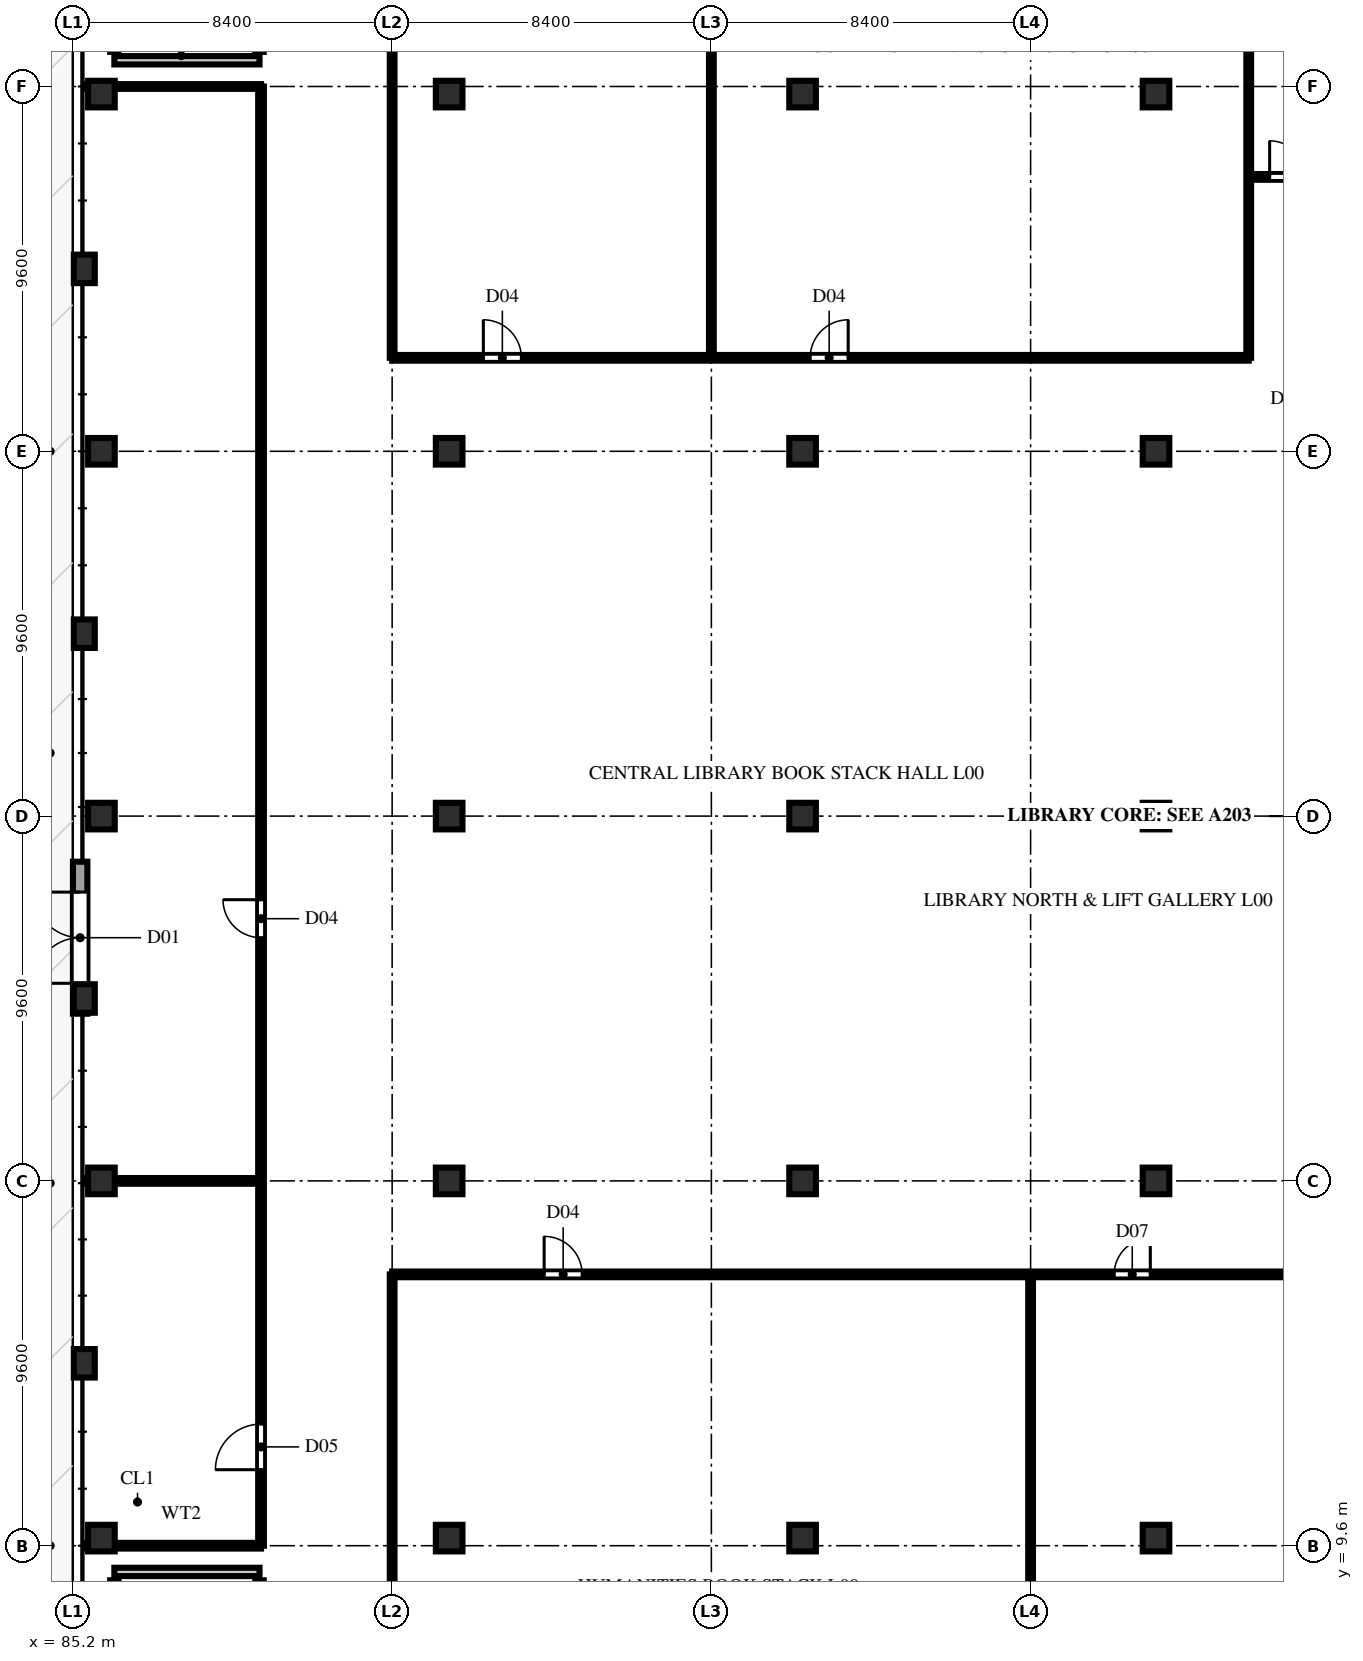
"""IFC4 building model, lengths in metres.
Left out: names, types, materials, properties, quantities, classifications, styles, units other than length and angle.
Written with IfcOpenShell. Run it as: python <this file> out.ifc"""

import sys

from ifc_helpers import new_model, si_unit, direction, frame, frame_2d, origin, origin_2d, place, context, subcontext, project, spatial, rectangle, extrude, element, fill, save


model = new_model("IFC4")
c1 = context("Model", 3, precision=1e-05, world=origin(), true_north=direction((0.0, 1.0)))
c2 = subcontext(c1, "Body", "Model", "MODEL_VIEW")
j1 = project(units=[si_unit("LENGTHUNIT", "METRE"), si_unit("PLANEANGLEUNIT", "RADIAN")], contexts=[c1])
p1 = place(None, origin())
s1 = spatial("IfcSite", under=j1, at=p1, CompositionType="ELEMENT")
p2 = place(p1, origin())
s2 = spatial("IfcBuilding", under=s1, at=p2, CompositionType="ELEMENT")
p3 = place(p2, origin())
s3 = spatial("IfcBuildingStorey", under=s2, at=p3, CompositionType="ELEMENT", Elevation=0.0)
for number, where, z_axis, x_axis in (
    (1, (85.95, 9.8, 0.0), (0.0, 0.0, 1.0), (1.0, 0.0, 0.0)),
    (2, (85.95, 19.2, 0.0), (0.0, 0.0, 1.0), (1.0, 0.0, 0.0)),
    (3, (85.95, 28.8, 0.0), (0.0, 0.0, 1.0), (1.0, 0.0, 0.0)),
    (4, (85.95, 38.4, 0.0), (0.0, 0.0, 1.0), (1.0, 0.0, 0.0)),
    (5, (85.95, 47.8, 0.0), (0.0, 0.0, 1.0), (1.0, 0.0, 0.0)),
    (6, (95.1, 9.8, 0.0), (0.0, 0.0, 1.0), (1.0, 0.0, 0.0)),
    (7, (95.1, 19.2, 0.0), (0.0, 0.0, 1.0), (1.0, 0.0, 0.0)),
    (8, (95.1, 28.8, 0.0), (0.0, 0.0, 1.0), (1.0, 0.0, 0.0)),
    (9, (95.1, 38.4, 0.0), (0.0, 0.0, 1.0), (1.0, 0.0, 0.0)),
    (10, (95.1, 47.8, 0.0), (0.0, 0.0, 1.0), (1.0, 0.0, 0.0)),
    (11, (104.4, 9.8, 0.0), (0.0, 0.0, 1.0), (1.0, 0.0, 0.0)),
    (12, (104.4, 19.2, 0.0), (0.0, 0.0, 1.0), (1.0, 0.0, 0.0)),
    (13, (104.4, 28.8, 0.0), (0.0, 0.0, 1.0), (1.0, 0.0, 0.0)),
    (14, (104.4, 38.4, 0.0), (0.0, 0.0, 1.0), (1.0, 0.0, 0.0)),
    (15, (104.4, 47.8, 0.0), (0.0, 0.0, 1.0), (1.0, 0.0, 0.0)),
    (16, (113.7, 9.8, 0.0), (0.0, 0.0, 1.0), (1.0, 0.0, 0.0)),
    (17, (113.7, 19.2, 0.0), (0.0, 0.0, 1.0), (1.0, 0.0, 0.0)),
    (18, (113.7, 28.8, 0.0), (0.0, 0.0, 1.0), (1.0, 0.0, 0.0)),
    (19, (113.7, 38.4, 0.0), (0.0, 0.0, 1.0), (1.0, 0.0, 0.0)),
    (20, (113.7, 47.8, 0.0), (0.0, 0.0, 1.0), (1.0, 0.0, 0.0)),
):
    element("IfcColumn", number, at=place(p3, frame(where, z_axis=z_axis, x_axis=x_axis)), inside=s3, PredefinedType="COLUMN", context=c2, shape_type="SweptSolid", body=[
        extrude(rectangle(XDim=0.7, YDim=0.7, at=origin_2d()), origin(), (0.0, 0.0, 1.0), 5.2),
    ])
for number, where, z_axis, x_axis in (
    (21, (85.5, 14.4, 0.0), (0.0, 0.0, 1.0), (1.0, 0.0, 0.0)),
    (22, (85.5, 24.0, 0.0), (0.0, 0.0, 1.0), (1.0, 0.0, 0.0)),
    (23, (85.5, 33.6, 0.0), (0.0, 0.0, 1.0), (1.0, 0.0, 0.0)),
    (24, (85.5, 43.2, 0.0), (0.0, 0.0, 1.0), (1.0, 0.0, 0.0)),
):
    element("IfcColumn", number, at=place(p3, frame(where, z_axis=z_axis, x_axis=x_axis)), inside=s3, PredefinedType="PILASTER", context=c2, shape_type="SweptSolid", body=[
        extrude(rectangle(XDim=0.55, YDim=0.75, at=origin_2d()), origin(), (0.0, 0.0, 1.0), 5.2),
    ])
p4 = place(p3, frame((85.39, 23.6, 0.0), z_axis=(0.0, 0.0, 1.0), x_axis=(0.0, 1.0, 0.0)))
e25 = element("IfcWall", 25, at=p4, inside=s3, PredefinedType="SOLIDWALL", context=c2, shape_type="SweptSolid", body=[
    extrude(rectangle(XDim=4.0, YDim=0.38, at=frame_2d((2.0, 0.0))), origin(), (0.0, 0.0, 1.0), 4.85),
])
p5 = place(p4, frame((0.8, 0.0, 0.0)))
e26 = element("IfcOpeningElement", 26, at=p5, cuts=e25, PredefinedType="OPENING", context=c2, shape_type="SweptSolid", body=[
    extrude(rectangle(XDim=2.4, YDim=2.6, at=frame_2d((1.2, 1.3))), frame((0.0, 0.202, 0.0), z_axis=(0.0, -1.0, 0.0), x_axis=(1.0, 0.0, 0.0)), (0.0, 0.0, 1.0), 0.404),
])
p6 = place(p3, frame((86.29, 1.31, 0.0), z_axis=(0.0, 0.0, 1.0), x_axis=(0.0, 1.0, 0.0)))
e27 = element("IfcWall", 27, at=p6, inside=s3, PredefinedType="SOLIDWALL", context=c2, shape_type="SweptSolid", body=[
    extrude(rectangle(XDim=7.38, YDim=0.22, at=frame_2d((3.69, 0.0))), origin(), (0.0, 0.0, 1.0), 4.85),
])
p7 = place(p3, frame((86.29, 8.91, 0.0), z_axis=(0.0, 0.0, 1.0), x_axis=(1.0, 0.0, 0.0)))
e28 = element("IfcWall", 28, at=p7, inside=s3, PredefinedType="SOLIDWALL", context=c2, shape_type="SweptSolid", body=[
    extrude(rectangle(XDim=3.82, YDim=0.22, at=frame_2d((1.91, 0.0))), origin(), (0.0, 0.0, 1.0), 4.85),
])
p8 = place(p3, frame((90.11, 1.31, 0.0), z_axis=(0.0, 0.0, 1.0), x_axis=(0.0, 1.0, 0.0)))
e29 = element("IfcWall", 29, at=p8, inside=s3, PredefinedType="SOLIDWALL", context=c2, shape_type="SweptSolid", body=[
    extrude(rectangle(XDim=7.38, YDim=0.22, at=frame_2d((3.69, 0.0))), origin(), (0.0, 0.0, 1.0), 4.85),
])
p9 = place(p8, frame((0.14, 0.0, 0.0)))
e30 = element("IfcOpeningElement", 30, at=p9, cuts=e29, PredefinedType="OPENING", context=c2, shape_type="SweptSolid", body=[
    extrude(rectangle(XDim=1.1, YDim=2.2, at=frame_2d((0.55, 1.1))), frame((0.0, 0.122, 0.0), z_axis=(0.0, -1.0, 0.0), x_axis=(1.0, 0.0, 0.0)), (0.0, 0.0, 1.0), 0.244),
])
p10 = place(p3, frame((86.29, 48.91, 0.0), z_axis=(0.0, 0.0, 1.0), x_axis=(0.0, 1.0, 0.0)))
e31 = element("IfcWall", 31, at=p10, inside=s3, PredefinedType="SOLIDWALL", context=c2, shape_type="SweptSolid", body=[
    extrude(rectangle(XDim=7.38, YDim=0.22, at=frame_2d((3.69, 0.0))), origin(), (0.0, 0.0, 1.0), 4.85),
])
p11 = place(p3, frame((86.29, 48.69, 0.0), z_axis=(0.0, 0.0, 1.0), x_axis=(1.0, 0.0, 0.0)))
e32 = element("IfcWall", 32, at=p11, inside=s3, PredefinedType="SOLIDWALL", context=c2, shape_type="SweptSolid", body=[
    extrude(rectangle(XDim=3.82, YDim=0.22, at=frame_2d((1.91, 0.0))), origin(), (0.0, 0.0, 1.0), 4.85),
])
p12 = place(p3, frame((90.11, 48.91, 0.0), z_axis=(0.0, 0.0, 1.0), x_axis=(0.0, 1.0, 0.0)))
e33 = element("IfcWall", 33, at=p12, inside=s3, PredefinedType="SOLIDWALL", context=c2, shape_type="SweptSolid", body=[
    extrude(rectangle(XDim=7.38, YDim=0.22, at=frame_2d((3.69, 0.0))), origin(), (0.0, 0.0, 1.0), 4.85),
])
p13 = place(p12, frame((0.14, 0.0, 0.0)))
e34 = element("IfcOpeningElement", 34, at=p13, cuts=e33, PredefinedType="OPENING", context=c2, shape_type="SweptSolid", body=[
    extrude(rectangle(XDim=1.1, YDim=2.2, at=frame_2d((0.55, 1.1))), frame((0.0, 0.122, 0.0), z_axis=(0.0, -1.0, 0.0), x_axis=(1.0, 0.0, 0.0)), (0.0, 0.0, 1.0), 0.244),
])
p14 = place(p3, frame((85.55, 9.6, 0.0), z_axis=(0.0, 0.0, 1.0), x_axis=(1.0, 0.0, 0.0)))
e35 = element("IfcWall", 35, at=p14, inside=s3, PredefinedType="PARTITIONING", context=c2, shape_type="SweptSolid", body=[
    extrude(rectangle(XDim=0.4, YDim=0.15, at=frame_2d((0.2, 0.0))), origin(), (0.0, 0.0, 1.0), 4.85),
])
p15 = place(p3, frame((85.95, 9.6, 0.0), z_axis=(0.0, 0.0, 1.0), x_axis=(1.0, 0.0, 0.0)))
e36 = element("IfcWall", 36, at=p15, inside=s3, PredefinedType="PARTITIONING", context=c2, shape_type="SweptSolid", body=[
    extrude(rectangle(XDim=4.2, YDim=0.15, at=frame_2d((2.1, 0.0))), origin(), (0.0, 0.0, 1.0), 4.05),
])
p16 = place(p3, frame((85.55, 19.2, 0.0), z_axis=(0.0, 0.0, 1.0), x_axis=(1.0, 0.0, 0.0)))
e37 = element("IfcWall", 37, at=p16, inside=s3, PredefinedType="PARTITIONING", context=c2, shape_type="SweptSolid", body=[
    extrude(rectangle(XDim=0.4, YDim=0.15, at=frame_2d((0.2, 0.0))), origin(), (0.0, 0.0, 1.0), 4.85),
])
p17 = place(p3, frame((85.95, 19.2, 0.0), z_axis=(0.0, 0.0, 1.0), x_axis=(1.0, 0.0, 0.0)))
e38 = element("IfcWall", 38, at=p17, inside=s3, PredefinedType="PARTITIONING", context=c2, shape_type="SweptSolid", body=[
    extrude(rectangle(XDim=4.2, YDim=0.15, at=frame_2d((2.1, 0.0))), origin(), (0.0, 0.0, 1.0), 4.05),
])
p18 = place(p3, frame((85.55, 48.0, 0.0), z_axis=(0.0, 0.0, 1.0), x_axis=(1.0, 0.0, 0.0)))
e39 = element("IfcWall", 39, at=p18, inside=s3, PredefinedType="PARTITIONING", context=c2, shape_type="SweptSolid", body=[
    extrude(rectangle(XDim=0.4, YDim=0.125, at=frame_2d((0.2, 0.0))), origin(), (0.0, 0.0, 1.0), 4.85),
])
p19 = place(p3, frame((85.95, 48.0, 0.0), z_axis=(0.0, 0.0, 1.0), x_axis=(1.0, 0.0, 0.0)))
e40 = element("IfcWall", 40, at=p19, inside=s3, PredefinedType="PARTITIONING", context=c2, shape_type="SweptSolid", body=[
    extrude(rectangle(XDim=4.2, YDim=0.125, at=frame_2d((2.1, 0.0))), origin(), (0.0, 0.0, 1.0), 4.05),
])
p20 = place(p3, frame((90.15, 9.6, 0.0), z_axis=(0.0, 0.0, 1.0), x_axis=(0.0, 1.0, 0.0)))
e41 = element("IfcWall", 41, at=p20, inside=s3, PredefinedType="PARTITIONING", context=c2, shape_type="SweptSolid", body=[
    extrude(rectangle(XDim=38.4, YDim=0.15, at=frame_2d((19.2, 0.0))), origin(), (0.0, 0.0, 1.0), 4.85),
])
p21 = place(p20, frame((2.0, 0.0, 0.0)))
e42 = element("IfcOpeningElement", 42, at=p21, cuts=e41, PredefinedType="OPENING", context=c2, shape_type="SweptSolid", body=[
    extrude(rectangle(XDim=1.2, YDim=2.2, at=frame_2d((0.6, 1.1))), frame((0.0, 0.087, 0.0), z_axis=(0.0, -1.0, 0.0), x_axis=(1.0, 0.0, 0.0)), (0.0, 0.0, 1.0), 0.174),
])
p22 = place(p20, frame((16.0, 0.0, 0.0)))
e43 = element("IfcOpeningElement", 43, at=p22, cuts=e41, PredefinedType="OPENING", context=c2, shape_type="SweptSolid", body=[
    extrude(rectangle(XDim=1.0, YDim=2.2, at=frame_2d((0.5, 1.1))), frame((0.0, 0.087, 0.0), z_axis=(0.0, -1.0, 0.0), x_axis=(1.0, 0.0, 0.0)), (0.0, 0.0, 1.0), 0.174),
])
for number, where, z_axis, x_axis in (
    (44, (93.6, 0.35, 0.0), (0.0, 0.0, 1.0), (0.0, 1.0, 0.0)),
    (45, (110.4, 0.35, 0.0), (0.0, 0.0, 1.0), (0.0, 1.0, 0.0)),
):
    element("IfcWall", number, at=place(p3, frame(where, z_axis=z_axis, x_axis=x_axis)), inside=s3, PredefinedType="PARTITIONING", context=c2, shape_type="SweptSolid", body=[
        extrude(rectangle(XDim=16.39, YDim=0.125, at=frame_2d((8.195, 0.0))), origin(), (0.0, 0.0, 1.0), 4.85),
    ])
p23 = place(p3, frame((93.6, 16.74, 0.0), z_axis=(0.0, 0.0, 1.0), x_axis=(1.0, 0.0, 0.0)))
e46 = element("IfcWall", 46, at=p23, inside=s3, PredefinedType="PARTITIONING", context=c2, shape_type="SweptSolid", body=[
    extrude(rectangle(XDim=25.2, YDim=0.15, at=frame_2d((12.6, 0.0))), origin(), (0.0, 0.0, 1.0), 4.85),
])
p24 = place(p23, frame((4.0, 0.0, 0.0)))
e47 = element("IfcOpeningElement", 47, at=p24, cuts=e46, PredefinedType="OPENING", context=c2, shape_type="SweptSolid", body=[
    extrude(rectangle(XDim=1.0, YDim=2.2, at=frame_2d((0.5, 1.1))), frame((0.0, 0.087, 0.0), z_axis=(0.0, -1.0, 0.0), x_axis=(1.0, 0.0, 0.0)), (0.0, 0.0, 1.0), 0.174),
])
p25 = place(p23, frame((19.0, 0.0, 0.0)))
e48 = element("IfcOpeningElement", 48, at=p25, cuts=e46, PredefinedType="OPENING", context=c2, shape_type="SweptSolid", body=[
    extrude(rectangle(XDim=0.95, YDim=2.15, at=frame_2d((0.475, 1.075))), frame((0.0, 0.087, 0.0), z_axis=(0.0, -1.0, 0.0), x_axis=(1.0, 0.0, 0.0)), (0.0, 0.0, 1.0), 0.174),
])
for number, where, z_axis, x_axis in (
    (49, (93.6, 40.86, 0.0), (0.0, 0.0, 1.0), (0.0, 1.0, 0.0)),
    (50, (102.0, 40.86, 0.0), (0.0, 0.0, 1.0), (0.0, 1.0, 0.0)),
    (51, (116.14, 40.86, 0.0), (0.0, 0.0, 1.0), (0.0, 1.0, 0.0)),
):
    element("IfcWall", number, at=place(p3, frame(where, z_axis=z_axis, x_axis=x_axis)), inside=s3, PredefinedType="PARTITIONING", context=c2, shape_type="SweptSolid", body=[
        extrude(rectangle(XDim=16.39, YDim=0.125, at=frame_2d((8.195, 0.0))), origin(), (0.0, 0.0, 1.0), 4.85),
    ])
p26 = place(p3, frame((93.6, 40.86, 0.0), z_axis=(0.0, 0.0, 1.0), x_axis=(1.0, 0.0, 0.0)))
e52 = element("IfcWall", 52, at=p26, inside=s3, PredefinedType="PARTITIONING", context=c2, shape_type="SweptSolid", body=[
    extrude(rectangle(XDim=22.54, YDim=0.15, at=frame_2d((11.27, 0.0))), origin(), (0.0, 0.0, 1.0), 4.85),
])
p27 = place(p26, frame((2.4, 0.0, 0.0)))
e53 = element("IfcOpeningElement", 53, at=p27, cuts=e52, PredefinedType="OPENING", context=c2, shape_type="SweptSolid", body=[
    extrude(rectangle(XDim=1.0, YDim=2.2, at=frame_2d((0.5, 1.1))), frame((0.0, 0.087, 0.0), z_axis=(0.0, -1.0, 0.0), x_axis=(1.0, 0.0, 0.0)), (0.0, 0.0, 1.0), 0.174),
])
p28 = place(p26, frame((11.0, 0.0, 0.0)))
e54 = element("IfcOpeningElement", 54, at=p28, cuts=e52, PredefinedType="OPENING", context=c2, shape_type="SweptSolid", body=[
    extrude(rectangle(XDim=1.0, YDim=2.2, at=frame_2d((0.5, 1.1))), frame((0.0, 0.087, 0.0), z_axis=(0.0, -1.0, 0.0), x_axis=(1.0, 0.0, 0.0)), (0.0, 0.0, 1.0), 0.174),
])
p29 = place(p3, frame((116.14, 45.62, 0.0), z_axis=(0.0, 0.0, 1.0), x_axis=(1.0, 0.0, 0.0)))
e55 = element("IfcWall", 55, at=p29, inside=s3, PredefinedType="PARTITIONING", context=c2, shape_type="SweptSolid", body=[
    extrude(rectangle(XDim=10.71, YDim=0.15, at=frame_2d((5.355, 0.0))), origin(), (0.0, 0.0, 1.0), 4.85),
])
p30 = place(p29, frame((0.55, 0.0, 0.0)))
e56 = element("IfcOpeningElement", 56, at=p30, cuts=e55, PredefinedType="OPENING", context=c2, shape_type="SweptSolid", body=[
    extrude(rectangle(XDim=0.95, YDim=2.15, at=frame_2d((0.475, 1.075))), frame((0.0, 0.087, 0.0), z_axis=(0.0, -1.0, 0.0), x_axis=(1.0, 0.0, 0.0)), (0.0, 0.0, 1.0), 0.174),
])
p31 = place(p5, origin())
e57 = element("IfcDoor", 57, at=p31, inside=s3, OperationType="DOUBLE_SWING_LEFT", PredefinedType="DOOR", context=c2, shape_type="SweptSolid", body=[
    extrude(rectangle(XDim=2.4, YDim=2.6, at=frame_2d((1.2, 1.3))), frame((0.0, 0.025, 0.0), z_axis=(0.0, -1.0, 0.0), x_axis=(1.0, 0.0, 0.0)), (0.0, 0.0, 1.0), 0.05),
])
fill(e26, e57)
p32 = place(p21, origin())
e58 = element("IfcDoor", 58, at=p32, inside=s3, OperationType="SINGLE_SWING_LEFT", PredefinedType="DOOR", context=c2, shape_type="SweptSolid", body=[
    extrude(rectangle(XDim=1.2, YDim=2.2, at=frame_2d((0.6, 1.1))), frame((0.0, 0.025, 0.0), z_axis=(0.0, -1.0, 0.0), x_axis=(1.0, 0.0, 0.0)), (0.0, 0.0, 1.0), 0.05),
])
fill(e42, e58)
p33 = place(p22, origin())
e59 = element("IfcDoor", 59, at=p33, inside=s3, OperationType="SINGLE_SWING_RIGHT", PredefinedType="DOOR", context=c2, shape_type="SweptSolid", body=[
    extrude(rectangle(XDim=1.0, YDim=2.2, at=frame_2d((0.5, 1.1))), frame((0.0, 0.025, 0.0), z_axis=(0.0, -1.0, 0.0), x_axis=(1.0, 0.0, 0.0)), (0.0, 0.0, 1.0), 0.05),
])
fill(e43, e59)
p34 = place(p24, origin())
e60 = element("IfcDoor", 60, at=p34, inside=s3, OperationType="SINGLE_SWING_LEFT", PredefinedType="DOOR", context=c2, shape_type="SweptSolid", body=[
    extrude(rectangle(XDim=1.0, YDim=2.2, at=frame_2d((0.5, 1.1))), frame((0.0, 0.025, 0.0), z_axis=(0.0, -1.0, 0.0), x_axis=(1.0, 0.0, 0.0)), (0.0, 0.0, 1.0), 0.05),
])
fill(e47, e60)
p35 = place(p25, origin())
e61 = element("IfcDoor", 61, at=p35, inside=s3, OperationType="SINGLE_SWING_RIGHT", PredefinedType="DOOR", context=c2, shape_type="SweptSolid", body=[
    extrude(rectangle(XDim=0.95, YDim=2.15, at=frame_2d((0.475, 1.075))), frame((0.0, 0.025, 0.0), z_axis=(0.0, -1.0, 0.0), x_axis=(1.0, 0.0, 0.0)), (0.0, 0.0, 1.0), 0.05),
])
fill(e48, e61)
p36 = place(p27, origin())
e62 = element("IfcDoor", 62, at=p36, inside=s3, OperationType="SINGLE_SWING_LEFT", PredefinedType="DOOR", context=c2, shape_type="SweptSolid", body=[
    extrude(rectangle(XDim=1.0, YDim=2.2, at=frame_2d((0.5, 1.1))), frame((0.0, 0.025, 0.0), z_axis=(0.0, -1.0, 0.0), x_axis=(1.0, 0.0, 0.0)), (0.0, 0.0, 1.0), 0.05),
])
fill(e53, e62)
p37 = place(p28, origin())
e63 = element("IfcDoor", 63, at=p37, inside=s3, OperationType="SINGLE_SWING_RIGHT", PredefinedType="DOOR", context=c2, shape_type="SweptSolid", body=[
    extrude(rectangle(XDim=1.0, YDim=2.2, at=frame_2d((0.5, 1.1))), frame((0.0, 0.025, 0.0), z_axis=(0.0, -1.0, 0.0), x_axis=(1.0, 0.0, 0.0)), (0.0, 0.0, 1.0), 0.05),
])
fill(e54, e63)
p38 = place(p30, origin())
e64 = element("IfcDoor", 64, at=p38, inside=s3, OperationType="SINGLE_SWING_LEFT", PredefinedType="DOOR", context=c2, shape_type="SweptSolid", body=[
    extrude(rectangle(XDim=0.95, YDim=2.15, at=frame_2d((0.475, 1.075))), frame((0.0, 0.025, 0.0), z_axis=(0.0, -1.0, 0.0), x_axis=(1.0, 0.0, 0.0)), (0.0, 0.0, 1.0), 0.05),
])
fill(e56, e64)
save(model, sys.argv[1])
